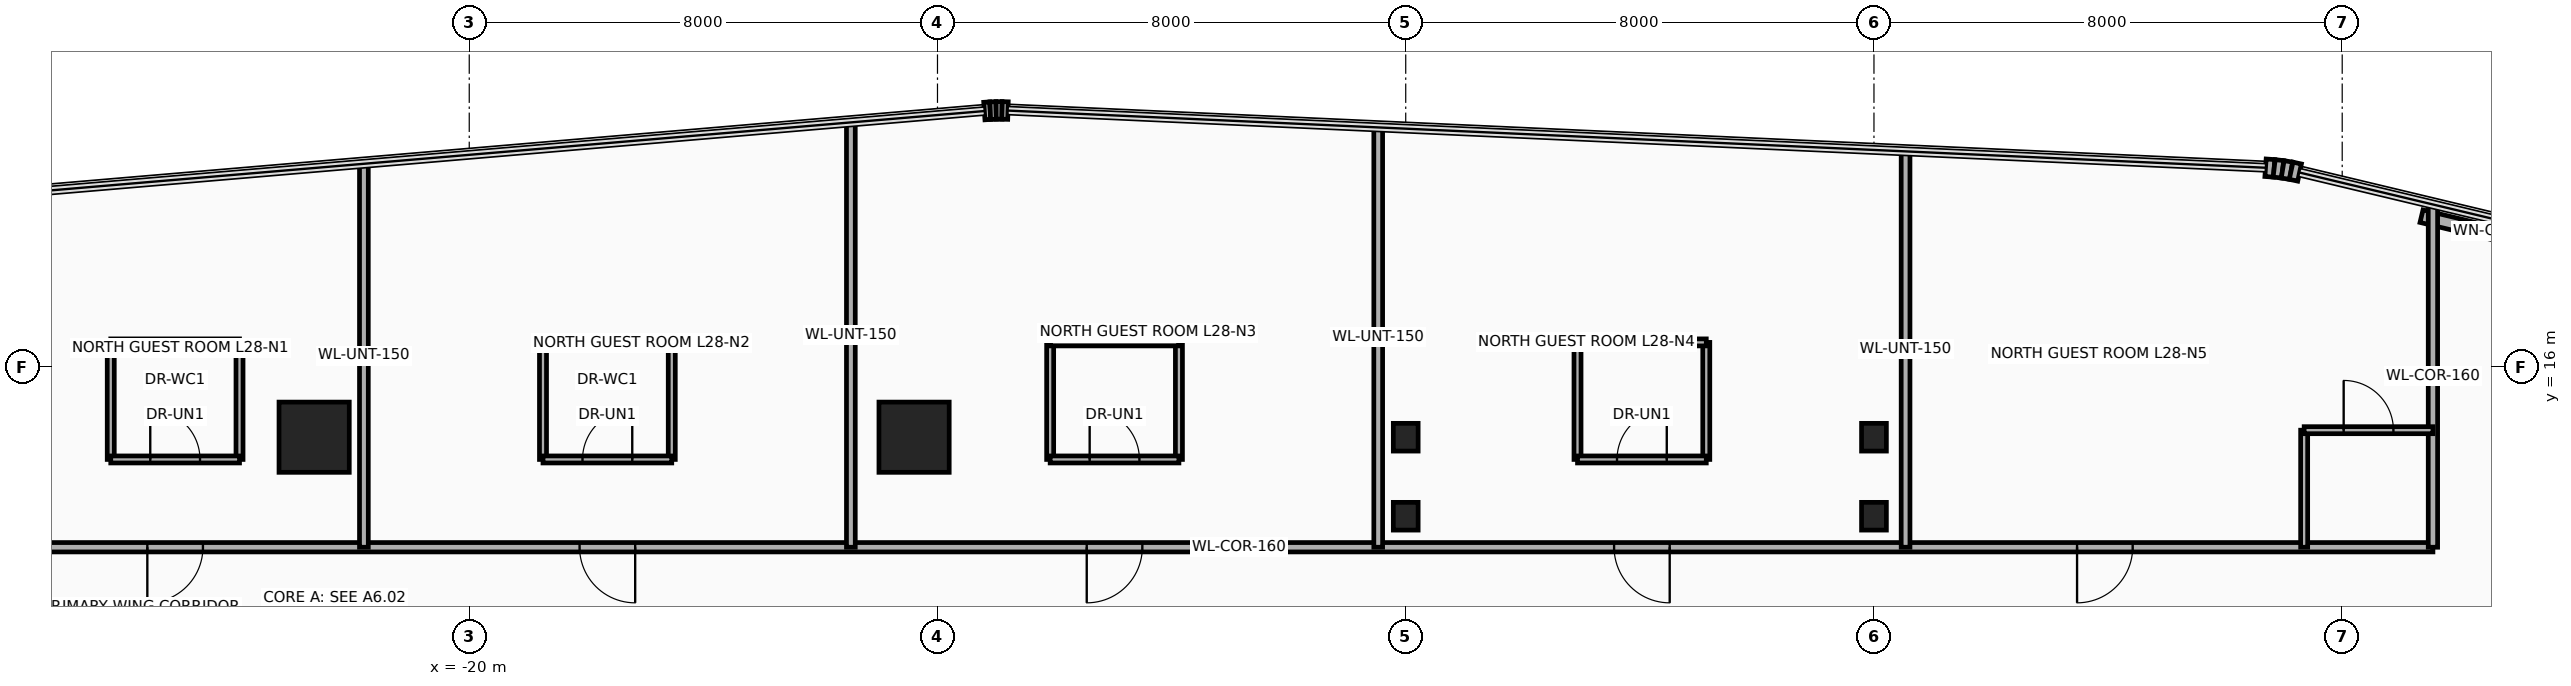
"""IFC4 building model, lengths in metres.
Left out: names, types, materials, properties, quantities, classifications, styles, units other than length and angle.
Written with IfcOpenShell. Run it as: python <this file> out.ifc"""

import sys

from ifc_helpers import new_model, si_unit, direction, frame, frame_2d, origin, origin_2d, place, context, subcontext, project, spatial, rectangle, i_section, extrude, source, transform, mapped, element, fill, save


model = new_model("IFC4")
c1 = context("Model", 3, precision=1e-05, world=origin(), true_north=direction((0.0, 1.0)))
c2 = subcontext(c1, "Body", "Model", "MODEL_VIEW")
j1 = project(units=[si_unit("LENGTHUNIT", "METRE"), si_unit("PLANEANGLEUNIT", "RADIAN")], contexts=[c1])
p1 = place(None, origin())
s1 = spatial("IfcSite", under=j1, at=p1, CompositionType="ELEMENT")
p2 = place(p1, origin())
s2 = spatial("IfcBuilding", under=s1, at=p2, CompositionType="ELEMENT")
p3 = place(p2, frame((0.0, 0.0, 113.1)))
s3 = spatial("IfcBuildingStorey", under=s2, at=p3, CompositionType="ELEMENT", Elevation=113.1)
m1 = source(origin(), c2, "Body", "SweptSolid", [
    extrude(rectangle(XDim=1.2, YDim=1.2, at=origin_2d()), origin(), (0.0, 0.0, 1.0), 3.7),
])
for number, where, z_axis, x_axis in (
    (1, (-22.65, 14.8, 0.0), (0.0, 0.0, 1.0), (1.0, 0.0, 0.0)),
    (2, (-12.4, 14.8, 0.0), (0.0, 0.0, 1.0), (1.0, 0.0, 0.0)),
):
    element("IfcColumn", number, at=place(p3, frame(where, z_axis=z_axis, x_axis=x_axis)), inside=s3, PredefinedType="COLUMN", context=c2, shape_type="MappedRepresentation", body=[
        mapped(m1, transform((0.0, 0.0, 0.0), x_axis=(1.0, 0.0, 0.0), y_axis=(0.0, 1.0, 0.0), z_axis=(0.0, 0.0, 1.0), scale=1.0)),
    ])
m2 = source(origin(), c2, "Body", "SweptSolid", [
    extrude(i_section(OverallWidth=0.424, OverallDepth=0.474, WebThickness=0.048, FlangeThickness=0.077, at=origin_2d()), origin(), (0.0, 0.0, 1.0), 3.7),
])
for number, where, z_axis, x_axis in (
    (3, (-4.0, 13.45, 0.0), (0.0, 0.0, 1.0), (1.0, 0.0, 0.0)),
    (4, (-4.0, 14.8, 0.0), (0.0, 0.0, 1.0), (1.0, 0.0, 0.0)),
    (5, (4.0, 13.45, 0.0), (0.0, 0.0, 1.0), (1.0, 0.0, 0.0)),
    (6, (4.0, 14.8, 0.0), (0.0, 0.0, 1.0), (1.0, 0.0, 0.0)),
):
    element("IfcColumn", number, at=place(p3, frame(where, z_axis=z_axis, x_axis=x_axis)), inside=s3, PredefinedType="COLUMN", context=c2, shape_type="MappedRepresentation", body=[
        mapped(m2, transform((0.0, 0.0, 0.0), x_axis=(1.0, 0.0, 0.0), y_axis=(0.0, 1.0, 0.0), z_axis=(0.0, 0.0, 1.0), scale=1.0)),
    ])
p4 = place(p3, frame((-11.199, 20.373, 0.0), z_axis=(0.0, 0.0, 1.0), x_axis=(0.997567332166, 0.069709524416, 0.0)))
e7 = element("IfcWall", 7, at=p4, inside=s3, PredefinedType="SOLIDWALL", context=c2, shape_type="SweptSolid", body=[
    extrude(rectangle(XDim=0.102, YDim=0.3, at=frame_2d((0.051, 0.0))), origin(), (0.0, 0.0, 1.0), 3.46),
])
p5 = place(p3, frame((-11.098, 20.38, 0.0), z_axis=(0.0, 0.0, 1.0), x_axis=(0.999334672785, 0.03647206835, 0.0)))
e8 = element("IfcWall", 8, at=p5, inside=s3, PredefinedType="SOLIDWALL", context=c2, shape_type="SweptSolid", body=[
    extrude(rectangle(XDim=0.1, YDim=0.3, at=frame_2d((0.05, 0.0))), origin(), (0.0, 0.0, 1.0), 3.46),
])
p6 = place(p3, frame((-10.998, 20.383, 0.0), z_axis=(0.0, 0.0, 1.0), x_axis=(0.999997054401, 0.002427177317, 0.0)))
e9 = element("IfcWall", 9, at=p6, inside=s3, PredefinedType="SOLIDWALL", context=c2, shape_type="SweptSolid", body=[
    extrude(rectangle(XDim=0.101, YDim=0.3, at=frame_2d((0.05, 0.0))), origin(), (0.0, 0.0, 1.0), 3.46),
])
p7 = place(p3, frame((-10.897, 20.384, 0.0), z_axis=(0.0, 0.0, 1.0), x_axis=(0.999584209171, -0.02883415988, 0.0)))
e10 = element("IfcWall", 10, at=p7, inside=s3, PredefinedType="SOLIDWALL", context=c2, shape_type="SweptSolid", body=[
    extrude(rectangle(XDim=0.102, YDim=0.3, at=frame_2d((0.051, 0.0))), origin(), (0.0, 0.0, 1.0), 3.46),
])
p8 = place(p3, frame((10.69, 19.404, 0.0), z_axis=(0.0, 0.0, 1.0), x_axis=(0.99758310784, -0.069483400546, 0.0)))
e11 = element("IfcWall", 11, at=p8, inside=s3, PredefinedType="SOLIDWALL", context=c2, shape_type="SweptSolid", body=[
    extrude(rectangle(XDim=0.147, YDim=0.3, at=frame_2d((0.074, 0.0))), origin(), (0.0, 0.0, 1.0), 3.46),
])
for number, where, z_axis, x_axis in (
    (12, (10.837, 19.394, 0.0), (0.0, 0.0, 1.0), (0.993, -0.117, 0.0)),
    (13, (10.983, 19.377, 0.0), (0.0, 0.0, 1.0), (0.987, -0.163, 0.0)),
):
    element("IfcWall", number, at=place(p3, frame(where, z_axis=z_axis, x_axis=x_axis)), inside=s3, PredefinedType="SOLIDWALL", context=c2, shape_type="SweptSolid", body=[
        extrude(rectangle(XDim=0.146, YDim=0.3, at=frame_2d((0.073, 0.0))), origin(), (0.0, 0.0, 1.0), 3.46),
    ])
p9 = place(p3, frame((11.127, 19.353, 0.0), z_axis=(0.0, 0.0, 1.0), x_axis=(0.978019841688, -0.208511844421, 0.0)))
e14 = element("IfcWall", 14, at=p9, inside=s3, PredefinedType="SOLIDWALL", context=c2, shape_type="SweptSolid", body=[
    extrude(rectangle(XDim=0.147, YDim=0.3, at=frame_2d((0.074, 0.0))), origin(), (0.0, 0.0, 1.0), 3.46),
])
p10 = place(p3, frame((13.355, 18.576, 0.0), z_axis=(0.0, 0.0, 1.0), x_axis=(0.97252211384, -0.232810519721, 0.0)))
e15 = element("IfcWall", 15, at=p10, inside=s3, PredefinedType="SOLIDWALL", context=c2, shape_type="SweptSolid", body=[
    extrude(rectangle(XDim=2.2, YDim=0.22, at=frame_2d((1.1, 0.0))), origin(), (0.0, 0.0, 1.0), 3.46),
])
p11 = place(p10, frame((0.65, 0.0, 0.95)))
e16 = element("IfcOpeningElement", 16, at=p11, cuts=e15, PredefinedType="OPENING", context=c2, shape_type="SweptSolid", body=[
    extrude(rectangle(XDim=0.9, YDim=1.3, at=frame_2d((0.45, 0.65))), frame((0.0, 0.125, 0.0), z_axis=(0.0, -1.0, 0.0), x_axis=(1.0, 0.0, 0.0)), (0.0, 0.0, 1.0), 0.25),
])
p12 = place(p3, frame((-28.25, 12.92, 0.0), z_axis=(0.0, 0.0, 1.0), x_axis=(1.0, 0.0, 0.0)))
e17 = element("IfcWall", 17, at=p12, inside=s3, PredefinedType="PARTITIONING", context=c2, shape_type="SweptSolid", body=[
    extrude(rectangle(XDim=41.8, YDim=0.16, at=frame_2d((20.9, 0.0))), origin(), (0.0, 0.0, 1.0), 2.666),
])
p13 = place(p12, frame((2.75, 0.0, 0.0)))
e18 = element("IfcOpeningElement", 18, at=p13, cuts=e17, PredefinedType="OPENING", context=c2, shape_type="SweptSolid", body=[
    extrude(rectangle(XDim=0.95, YDim=2.15, at=frame_2d((0.475, 1.075))), frame((0.0, 0.095, 0.0), z_axis=(0.0, -1.0, 0.0), x_axis=(1.0, 0.0, 0.0)), (0.0, 0.0, 1.0), 0.19),
])
p14 = place(p12, frame((10.135, 0.0, 0.0)))
e19 = element("IfcOpeningElement", 19, at=p14, cuts=e17, PredefinedType="OPENING", context=c2, shape_type="SweptSolid", body=[
    extrude(rectangle(XDim=0.95, YDim=2.15, at=frame_2d((0.475, 1.075))), frame((0.0, 0.095, 0.0), z_axis=(0.0, -1.0, 0.0), x_axis=(1.0, 0.0, 0.0)), (0.0, 0.0, 1.0), 0.19),
])
p15 = place(p12, frame((18.8, 0.0, 0.0)))
e20 = element("IfcOpeningElement", 20, at=p15, cuts=e17, PredefinedType="OPENING", context=c2, shape_type="SweptSolid", body=[
    extrude(rectangle(XDim=0.95, YDim=2.15, at=frame_2d((0.475, 1.075))), frame((0.0, 0.095, 0.0), z_axis=(0.0, -1.0, 0.0), x_axis=(1.0, 0.0, 0.0)), (0.0, 0.0, 1.0), 0.19),
])
p16 = place(p12, frame((27.81, 0.0, 0.0)))
e21 = element("IfcOpeningElement", 21, at=p16, cuts=e17, PredefinedType="OPENING", context=c2, shape_type="SweptSolid", body=[
    extrude(rectangle(XDim=0.95, YDim=2.15, at=frame_2d((0.475, 1.075))), frame((0.0, 0.095, 0.0), z_axis=(0.0, -1.0, 0.0), x_axis=(1.0, 0.0, 0.0)), (0.0, 0.0, 1.0), 0.19),
])
p17 = place(p12, frame((35.72, 0.0, 0.0)))
e22 = element("IfcOpeningElement", 22, at=p17, cuts=e17, PredefinedType="OPENING", context=c2, shape_type="SweptSolid", body=[
    extrude(rectangle(XDim=0.95, YDim=2.15, at=frame_2d((0.475, 1.075))), frame((0.0, 0.095, 0.0), z_axis=(0.0, -1.0, 0.0), x_axis=(1.0, 0.0, 0.0)), (0.0, 0.0, 1.0), 0.19),
])
p18 = place(p3, frame((13.55, 12.92, 0.0), z_axis=(0.0, 0.0, 1.0), x_axis=(0.0, 1.0, 0.0)))
e23 = element("IfcWall", 23, at=p18, inside=s3, PredefinedType="PARTITIONING", context=c2, shape_type="SweptSolid", body=[
    extrude(rectangle(XDim=5.857, YDim=0.16, at=frame_2d((2.928, 0.0))), origin(), (0.0, 0.0, 1.0), 2.666),
])
p19 = place(p3, frame((-21.8, 12.92, 0.0), z_axis=(0.0, 0.0, 1.0), x_axis=(0.0, 1.0, 0.0)))
e24 = element("IfcWall", 24, at=p19, inside=s3, PredefinedType="PARTITIONING", context=c2, shape_type="SweptSolid", body=[
    extrude(rectangle(XDim=6.552, YDim=0.15, at=frame_2d((3.276, 0.0))), origin(), (0.0, 0.0, 1.0), 2.666),
])
p20 = place(p3, frame((-13.48, 12.92, 0.0), z_axis=(0.0, 0.0, 1.0), x_axis=(0.0, 1.0, 0.0)))
e25 = element("IfcWall", 25, at=p20, inside=s3, PredefinedType="PARTITIONING", context=c2, shape_type="SweptSolid", body=[
    extrude(rectangle(XDim=7.259, YDim=0.15, at=frame_2d((3.629, 0.0))), origin(), (0.0, 0.0, 1.0), 2.666),
])
p21 = place(p3, frame((-4.47, 12.92, 0.0), z_axis=(0.0, 0.0, 1.0), x_axis=(0.0, 1.0, 0.0)))
e26 = element("IfcWall", 26, at=p21, inside=s3, PredefinedType="PARTITIONING", context=c2, shape_type="SweptSolid", body=[
    extrude(rectangle(XDim=7.173, YDim=0.15, at=frame_2d((3.586, 0.0))), origin(), (0.0, 0.0, 1.0), 2.666),
])
p22 = place(p3, frame((4.54, 12.92, 0.0), z_axis=(0.0, 0.0, 1.0), x_axis=(0.0, 1.0, 0.0)))
e27 = element("IfcWall", 27, at=p22, inside=s3, PredefinedType="PARTITIONING", context=c2, shape_type="SweptSolid", body=[
    extrude(rectangle(XDim=6.764, YDim=0.15, at=frame_2d((3.382, 0.0))), origin(), (0.0, 0.0, 1.0), 2.666),
])
for number, where, z_axis, x_axis in (
    (28, (-26.125, 14.42, 0.0), (0.0, 0.0, 1.0), (0.0, 1.0, 0.0)),
    (29, (-23.925, 14.42, 0.0), (0.0, 0.0, 1.0), (0.0, 1.0, 0.0)),
):
    element("IfcWall", number, at=place(p3, frame(where, z_axis=z_axis, x_axis=x_axis)), inside=s3, PredefinedType="PARTITIONING", context=c2, shape_type="SweptSolid", body=[
        extrude(rectangle(XDim=2.0, YDim=0.12, at=frame_2d((1.0, 0.0))), origin(), (0.0, 0.0, 1.0), 2.666),
    ])
p23 = place(p3, frame((-26.125, 16.42, 0.0), z_axis=(0.0, 0.0, 1.0), x_axis=(1.0, 0.0, 0.0)))
e30 = element("IfcWall", 30, at=p23, inside=s3, PredefinedType="PARTITIONING", context=c2, shape_type="SweptSolid", body=[
    extrude(rectangle(XDim=2.2, YDim=0.12, at=frame_2d((1.1, 0.0))), origin(), (0.0, 0.0, 1.0), 3.46),
])
p24 = place(p3, frame((-26.125, 14.42, 0.0), z_axis=(0.0, 0.0, 1.0), x_axis=(1.0, 0.0, 0.0)))
e31 = element("IfcWall", 31, at=p24, inside=s3, PredefinedType="PARTITIONING", context=c2, shape_type="SweptSolid", body=[
    extrude(rectangle(XDim=2.2, YDim=0.12, at=frame_2d((1.1, 0.0))), origin(), (0.0, 0.0, 1.0), 3.46),
])
p25 = place(p24, frame((0.675, 0.0, 0.0)))
e32 = element("IfcOpeningElement", 32, at=p25, cuts=e31, PredefinedType="OPENING", context=c2, shape_type="SweptSolid", body=[
    extrude(rectangle(XDim=0.85, YDim=2.1, at=frame_2d((0.425, 1.05))), frame((0.0, 0.075, 0.0), z_axis=(0.0, -1.0, 0.0), x_axis=(1.0, 0.0, 0.0)), (0.0, 0.0, 1.0), 0.15),
])
for number, where, z_axis, x_axis in (
    (33, (-18.74, 14.42, 0.0), (0.0, 0.0, 1.0), (0.0, 1.0, 0.0)),
    (34, (-16.54, 14.42, 0.0), (0.0, 0.0, 1.0), (0.0, 1.0, 0.0)),
):
    element("IfcWall", number, at=place(p3, frame(where, z_axis=z_axis, x_axis=x_axis)), inside=s3, PredefinedType="PARTITIONING", context=c2, shape_type="SweptSolid", body=[
        extrude(rectangle(XDim=2.0, YDim=0.12, at=frame_2d((1.0, 0.0))), origin(), (0.0, 0.0, 1.0), 2.666),
    ])
p26 = place(p3, frame((-18.74, 16.42, 0.0), z_axis=(0.0, 0.0, 1.0), x_axis=(1.0, 0.0, 0.0)))
e35 = element("IfcWall", 35, at=p26, inside=s3, PredefinedType="PARTITIONING", context=c2, shape_type="SweptSolid", body=[
    extrude(rectangle(XDim=2.2, YDim=0.12, at=frame_2d((1.1, 0.0))), origin(), (0.0, 0.0, 1.0), 3.46),
])
p27 = place(p3, frame((-18.74, 14.42, 0.0), z_axis=(0.0, 0.0, 1.0), x_axis=(1.0, 0.0, 0.0)))
e36 = element("IfcWall", 36, at=p27, inside=s3, PredefinedType="PARTITIONING", context=c2, shape_type="SweptSolid", body=[
    extrude(rectangle(XDim=2.2, YDim=0.12, at=frame_2d((1.1, 0.0))), origin(), (0.0, 0.0, 1.0), 3.46),
])
p28 = place(p27, frame((0.675, 0.0, 0.0)))
e37 = element("IfcOpeningElement", 37, at=p28, cuts=e36, PredefinedType="OPENING", context=c2, shape_type="SweptSolid", body=[
    extrude(rectangle(XDim=0.85, YDim=2.1, at=frame_2d((0.425, 1.05))), frame((0.0, 0.075, 0.0), z_axis=(0.0, -1.0, 0.0), x_axis=(1.0, 0.0, 0.0)), (0.0, 0.0, 1.0), 0.15),
])
for number, where, z_axis, x_axis in (
    (38, (-10.075, 14.42, 0.0), (0.0, 0.0, 1.0), (0.0, 1.0, 0.0)),
    (39, (-7.875, 14.42, 0.0), (0.0, 0.0, 1.0), (0.0, 1.0, 0.0)),
):
    element("IfcWall", number, at=place(p3, frame(where, z_axis=z_axis, x_axis=x_axis)), inside=s3, PredefinedType="PARTITIONING", context=c2, shape_type="SweptSolid", body=[
        extrude(rectangle(XDim=2.0, YDim=0.12, at=frame_2d((1.0, 0.0))), origin(), (0.0, 0.0, 1.0), 2.666),
    ])
p29 = place(p3, frame((-10.075, 16.42, 0.0), z_axis=(0.0, 0.0, 1.0), x_axis=(1.0, 0.0, 0.0)))
e40 = element("IfcWall", 40, at=p29, inside=s3, PredefinedType="PARTITIONING", context=c2, shape_type="SweptSolid", body=[
    extrude(rectangle(XDim=2.2, YDim=0.12, at=frame_2d((1.1, 0.0))), origin(), (0.0, 0.0, 1.0), 3.46),
])
p30 = place(p3, frame((-10.075, 14.42, 0.0), z_axis=(0.0, 0.0, 1.0), x_axis=(1.0, 0.0, 0.0)))
e41 = element("IfcWall", 41, at=p30, inside=s3, PredefinedType="PARTITIONING", context=c2, shape_type="SweptSolid", body=[
    extrude(rectangle(XDim=2.2, YDim=0.12, at=frame_2d((1.1, 0.0))), origin(), (0.0, 0.0, 1.0), 3.46),
])
p31 = place(p30, frame((0.675, 0.0, 0.0)))
e42 = element("IfcOpeningElement", 42, at=p31, cuts=e41, PredefinedType="OPENING", context=c2, shape_type="SweptSolid", body=[
    extrude(rectangle(XDim=0.85, YDim=2.1, at=frame_2d((0.425, 1.05))), frame((0.0, 0.075, 0.0), z_axis=(0.0, -1.0, 0.0), x_axis=(1.0, 0.0, 0.0)), (0.0, 0.0, 1.0), 0.15),
])
for number, where, z_axis, x_axis in (
    (43, (-1.065, 14.42, 0.0), (0.0, 0.0, 1.0), (0.0, 1.0, 0.0)),
    (44, (1.135, 14.42, 0.0), (0.0, 0.0, 1.0), (0.0, 1.0, 0.0)),
):
    element("IfcWall", number, at=place(p3, frame(where, z_axis=z_axis, x_axis=x_axis)), inside=s3, PredefinedType="PARTITIONING", context=c2, shape_type="SweptSolid", body=[
        extrude(rectangle(XDim=2.0, YDim=0.12, at=frame_2d((1.0, 0.0))), origin(), (0.0, 0.0, 1.0), 2.666),
    ])
p32 = place(p3, frame((-1.065, 16.42, 0.0), z_axis=(0.0, 0.0, 1.0), x_axis=(1.0, 0.0, 0.0)))
e45 = element("IfcWall", 45, at=p32, inside=s3, PredefinedType="PARTITIONING", context=c2, shape_type="SweptSolid", body=[
    extrude(rectangle(XDim=2.2, YDim=0.12, at=frame_2d((1.1, 0.0))), origin(), (0.0, 0.0, 1.0), 3.46),
])
p33 = place(p3, frame((-1.065, 14.42, 0.0), z_axis=(0.0, 0.0, 1.0), x_axis=(1.0, 0.0, 0.0)))
e46 = element("IfcWall", 46, at=p33, inside=s3, PredefinedType="PARTITIONING", context=c2, shape_type="SweptSolid", body=[
    extrude(rectangle(XDim=2.2, YDim=0.12, at=frame_2d((1.1, 0.0))), origin(), (0.0, 0.0, 1.0), 3.46),
])
p34 = place(p33, frame((0.675, 0.0, 0.0)))
e47 = element("IfcOpeningElement", 47, at=p34, cuts=e46, PredefinedType="OPENING", context=c2, shape_type="SweptSolid", body=[
    extrude(rectangle(XDim=0.85, YDim=2.1, at=frame_2d((0.425, 1.05))), frame((0.0, 0.075, 0.0), z_axis=(0.0, -1.0, 0.0), x_axis=(1.0, 0.0, 0.0)), (0.0, 0.0, 1.0), 0.15),
])
p35 = place(p3, frame((11.35, 12.92, 0.0), z_axis=(0.0, 0.0, 1.0), x_axis=(0.0, 1.0, 0.0)))
e48 = element("IfcWall", 48, at=p35, inside=s3, PredefinedType="PARTITIONING", context=c2, shape_type="SweptSolid", body=[
    extrude(rectangle(XDim=2.0, YDim=0.12, at=frame_2d((1.0, 0.0))), origin(), (0.0, 0.0, 1.0), 2.666),
])
p36 = place(p3, frame((11.35, 14.92, 0.0), z_axis=(0.0, 0.0, 1.0), x_axis=(1.0, 0.0, 0.0)))
e49 = element("IfcWall", 49, at=p36, inside=s3, PredefinedType="PARTITIONING", context=c2, shape_type="SweptSolid", body=[
    extrude(rectangle(XDim=2.2, YDim=0.12, at=frame_2d((1.1, 0.0))), origin(), (0.0, 0.0, 1.0), 3.46),
])
p37 = place(p36, frame((0.675, 0.0, 0.0)))
e50 = element("IfcOpeningElement", 50, at=p37, cuts=e49, PredefinedType="OPENING", context=c2, shape_type="SweptSolid", body=[
    extrude(rectangle(XDim=0.85, YDim=2.1, at=frame_2d((0.425, 1.05))), frame((0.0, 0.075, 0.0), z_axis=(0.0, -1.0, 0.0), x_axis=(1.0, 0.0, 0.0)), (0.0, 0.0, 1.0), 0.15),
])
p38 = place(p11, origin())
e51 = element("IfcWindow", 51, at=p38, inside=s3, PartitioningType="SINGLE_PANEL", PredefinedType="WINDOW", context=c2, shape_type="SweptSolid", body=[
    extrude(rectangle(XDim=0.9, YDim=1.3, at=frame_2d((0.45, 0.65))), frame((0.0, 0.03, 0.0), z_axis=(0.0, -1.0, 0.0), x_axis=(1.0, 0.0, 0.0)), (0.0, 0.0, 1.0), 0.06),
])
fill(e16, e51)
p39 = place(p13, frame((0.95, 0.0, 0.0), z_axis=(0.0, 0.0, 1.0), x_axis=(-1.0, 0.0, 0.0)))
e52 = element("IfcDoor", 52, at=p39, inside=s3, OperationType="SINGLE_SWING_LEFT", PredefinedType="DOOR", context=c2, shape_type="SweptSolid", body=[
    extrude(rectangle(XDim=0.95, YDim=2.15, at=frame_2d((0.475, 1.075))), frame((0.0, 0.025, 0.0), z_axis=(0.0, -1.0, 0.0), x_axis=(1.0, 0.0, 0.0)), (0.0, 0.0, 1.0), 0.05),
])
fill(e18, e52)
p40 = place(p25, origin())
e53 = element("IfcDoor", 53, at=p40, inside=s3, OperationType="SINGLE_SWING_RIGHT", PredefinedType="DOOR", context=c2, shape_type="SweptSolid", body=[
    extrude(rectangle(XDim=0.85, YDim=2.1, at=frame_2d((0.425, 1.05))), frame((0.0, 0.025, 0.0), z_axis=(0.0, -1.0, 0.0), x_axis=(1.0, 0.0, 0.0)), (0.0, 0.0, 1.0), 0.05),
])
fill(e32, e53)
p41 = place(p14, frame((0.95, 0.0, 0.0), z_axis=(0.0, 0.0, 1.0), x_axis=(-1.0, 0.0, 0.0)))
e54 = element("IfcDoor", 54, at=p41, inside=s3, OperationType="SINGLE_SWING_LEFT", PredefinedType="DOOR", context=c2, shape_type="SweptSolid", body=[
    extrude(rectangle(XDim=0.95, YDim=2.15, at=frame_2d((0.475, 1.075))), frame((0.0, 0.025, 0.0), z_axis=(0.0, -1.0, 0.0), x_axis=(1.0, 0.0, 0.0)), (0.0, 0.0, 1.0), 0.05),
])
fill(e19, e54)
p42 = place(p28, origin())
e55 = element("IfcDoor", 55, at=p42, inside=s3, OperationType="SINGLE_SWING_RIGHT", PredefinedType="DOOR", context=c2, shape_type="SweptSolid", body=[
    extrude(rectangle(XDim=0.85, YDim=2.1, at=frame_2d((0.425, 1.05))), frame((0.0, 0.025, 0.0), z_axis=(0.0, -1.0, 0.0), x_axis=(1.0, 0.0, 0.0)), (0.0, 0.0, 1.0), 0.05),
])
fill(e37, e55)
p43 = place(p15, frame((0.95, 0.0, 0.0), z_axis=(0.0, 0.0, 1.0), x_axis=(-1.0, 0.0, 0.0)))
e56 = element("IfcDoor", 56, at=p43, inside=s3, OperationType="SINGLE_SWING_LEFT", PredefinedType="DOOR", context=c2, shape_type="SweptSolid", body=[
    extrude(rectangle(XDim=0.95, YDim=2.15, at=frame_2d((0.475, 1.075))), frame((0.0, 0.025, 0.0), z_axis=(0.0, -1.0, 0.0), x_axis=(1.0, 0.0, 0.0)), (0.0, 0.0, 1.0), 0.05),
])
fill(e20, e56)
p44 = place(p31, origin())
e57 = element("IfcDoor", 57, at=p44, inside=s3, OperationType="SINGLE_SWING_RIGHT", PredefinedType="DOOR", context=c2, shape_type="SweptSolid", body=[
    extrude(rectangle(XDim=0.85, YDim=2.1, at=frame_2d((0.425, 1.05))), frame((0.0, 0.025, 0.0), z_axis=(0.0, -1.0, 0.0), x_axis=(1.0, 0.0, 0.0)), (0.0, 0.0, 1.0), 0.05),
])
fill(e42, e57)
p45 = place(p16, frame((0.95, 0.0, 0.0), z_axis=(0.0, 0.0, 1.0), x_axis=(-1.0, 0.0, 0.0)))
e58 = element("IfcDoor", 58, at=p45, inside=s3, OperationType="SINGLE_SWING_LEFT", PredefinedType="DOOR", context=c2, shape_type="SweptSolid", body=[
    extrude(rectangle(XDim=0.95, YDim=2.15, at=frame_2d((0.475, 1.075))), frame((0.0, 0.025, 0.0), z_axis=(0.0, -1.0, 0.0), x_axis=(1.0, 0.0, 0.0)), (0.0, 0.0, 1.0), 0.05),
])
fill(e21, e58)
p46 = place(p34, origin())
e59 = element("IfcDoor", 59, at=p46, inside=s3, OperationType="SINGLE_SWING_RIGHT", PredefinedType="DOOR", context=c2, shape_type="SweptSolid", body=[
    extrude(rectangle(XDim=0.85, YDim=2.1, at=frame_2d((0.425, 1.05))), frame((0.0, 0.025, 0.0), z_axis=(0.0, -1.0, 0.0), x_axis=(1.0, 0.0, 0.0)), (0.0, 0.0, 1.0), 0.05),
])
fill(e47, e59)
p47 = place(p17, frame((0.95, 0.0, 0.0), z_axis=(0.0, 0.0, 1.0), x_axis=(-1.0, 0.0, 0.0)))
e60 = element("IfcDoor", 60, at=p47, inside=s3, OperationType="SINGLE_SWING_LEFT", PredefinedType="DOOR", context=c2, shape_type="SweptSolid", body=[
    extrude(rectangle(XDim=0.95, YDim=2.15, at=frame_2d((0.475, 1.075))), frame((0.0, 0.025, 0.0), z_axis=(0.0, -1.0, 0.0), x_axis=(1.0, 0.0, 0.0)), (0.0, 0.0, 1.0), 0.05),
])
fill(e22, e60)
p48 = place(p37, origin())
e61 = element("IfcDoor", 61, at=p48, inside=s3, OperationType="SINGLE_SWING_RIGHT", PredefinedType="DOOR", context=c2, shape_type="SweptSolid", body=[
    extrude(rectangle(XDim=0.85, YDim=2.1, at=frame_2d((0.425, 1.05))), frame((0.0, 0.025, 0.0), z_axis=(0.0, -1.0, 0.0), x_axis=(1.0, 0.0, 0.0)), (0.0, 0.0, 1.0), 0.05),
])
fill(e50, e61)
save(model, sys.argv[1])
